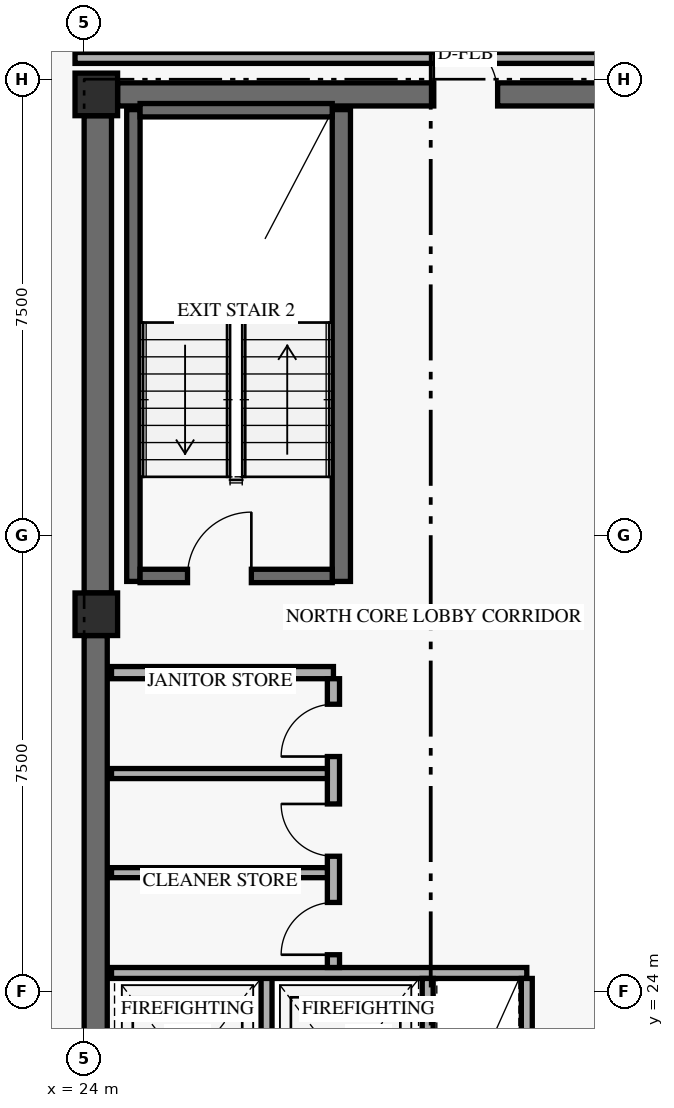
"""IFC4 building model, lengths in metres.
Left out: names, types, materials, properties, quantities, classifications, styles, units other than length and angle.
Written with IfcOpenShell. Run it as: python <this file> out.ifc"""

import sys

from ifc_helpers import new_model, si_unit, direction, frame, frame_2d, origin, origin_2d, place, context, subcontext, project, spatial, rectangle, extrude, element, fill, save


model = new_model("IFC4")
c1 = context("Model", 3, precision=1e-05, world=origin(), true_north=direction((0.0, 1.0)))
c2 = subcontext(c1, "Body", "Model", "MODEL_VIEW")
j1 = project(units=[si_unit("LENGTHUNIT", "METRE"), si_unit("PLANEANGLEUNIT", "RADIAN")], contexts=[c1])
p1 = place(None, origin())
s1 = spatial("IfcSite", under=j1, at=p1, CompositionType="ELEMENT")
p2 = place(p1, origin())
s2 = spatial("IfcBuilding", under=s1, at=p2, CompositionType="ELEMENT")
p3 = place(p2, frame((0.0, 0.0, 141.0)))
s3 = spatial("IfcBuildingStorey", under=s2, at=p3, CompositionType="ELEMENT", Elevation=141.0)
p4 = place(p3, frame((24.19, 17.9, 0.0), z_axis=(0.0, 0.0, 1.0), x_axis=(0.0, 1.0, 0.0)))
e1 = element("IfcWall", 1, at=p4, inside=s3, PredefinedType="SHEAR", context=c2, shape_type="SweptSolid", body=[
    extrude(rectangle(XDim=11.95, YDim=0.38, at=frame_2d((5.975, 0.0))), origin(), (0.0, 0.0, 1.0), 2.748),
])
p5 = place(p3, frame((24.225, 30.55, 0.0), z_axis=(0.0, 0.0, 1.0), x_axis=(0.0, 1.0, 0.0)))
e2 = element("IfcWall", 2, at=p5, inside=s3, PredefinedType="SHEAR", context=c2, shape_type="SweptSolid", body=[
    extrude(rectangle(XDim=7.85, YDim=0.45, at=frame_2d((3.925, 0.0))), origin(), (0.0, 0.0, 1.0), 2.748),
])
p6 = place(p3, frame((24.55, 38.75, 0.0), z_axis=(0.0, 0.0, 1.0), x_axis=(1.0, 0.0, 0.0)))
e3 = element("IfcWall", 3, at=p6, inside=s3, PredefinedType="SHEAR", context=c2, shape_type="SweptSolid", body=[
    extrude(rectangle(XDim=10.3, YDim=0.38, at=frame_2d((5.15, 0.0))), origin(), (0.0, 0.0, 1.0), 3.36),
])
p7 = place(p6, frame((5.2, 0.0, 0.0)))
e4 = element("IfcOpeningElement", 4, at=p7, cuts=e3, PredefinedType="OPENING", context=c2, shape_type="SweptSolid", body=[
    extrude(rectangle(XDim=1.05, YDim=2.15, at=frame_2d((0.525, 1.075))), frame((0.0, 0.2, 0.0), z_axis=(0.0, -1.0, 0.0), x_axis=(1.0, 0.0, 0.0)), (0.0, 0.0, 1.0), 0.4),
])
p8 = place(p3, frame((24.81, 30.74, 0.0), z_axis=(0.0, 0.0, 1.0), x_axis=(0.0, 1.0, 0.0)))
e5 = element("IfcWall", 5, at=p8, inside=s3, PredefinedType="SHEAR", context=c2, shape_type="SweptSolid", body=[
    extrude(rectangle(XDim=7.76, YDim=0.22, at=frame_2d((3.88, 0.0))), origin(), (0.0, 0.0, 1.0), 3.36),
])
p9 = place(p3, frame((28.23, 30.74, 0.0), z_axis=(0.0, 0.0, 1.0), x_axis=(0.0, 1.0, 0.0)))
e6 = element("IfcWall", 6, at=p9, inside=s3, PredefinedType="SHEAR", context=c2, shape_type="SweptSolid", body=[
    extrude(rectangle(XDim=7.76, YDim=0.3, at=frame_2d((3.88, 0.0))), origin(), (0.0, 0.0, 1.0), 3.36),
])
p10 = place(p3, frame((24.92, 30.83, 0.0), z_axis=(0.0, 0.0, 1.0), x_axis=(1.0, 0.0, 0.0)))
e7 = element("IfcWall", 7, at=p10, inside=s3, PredefinedType="SHEAR", context=c2, shape_type="SweptSolid", body=[
    extrude(rectangle(XDim=3.16, YDim=0.22, at=frame_2d((1.58, 0.0))), origin(), (0.0, 0.0, 1.0), 3.36),
])
p11 = place(p10, frame((0.78, 0.0, 0.0)))
e8 = element("IfcOpeningElement", 8, at=p11, cuts=e7, PredefinedType="OPENING", context=c2, shape_type="SweptSolid", body=[
    extrude(rectangle(XDim=1.05, YDim=2.15, at=frame_2d((0.525, 1.075))), frame((0.0, 0.12, 0.0), z_axis=(0.0, -1.0, 0.0), x_axis=(1.0, 0.0, 0.0)), (0.0, 0.0, 1.0), 0.24),
])
p12 = place(p3, frame((24.92, 38.49, 0.0), z_axis=(0.0, 0.0, 1.0), x_axis=(1.0, 0.0, 0.0)))
e9 = element("IfcWall", 9, at=p12, inside=s3, PredefinedType="SHEAR", context=c2, shape_type="SweptSolid", body=[
    extrude(rectangle(XDim=3.16, YDim=0.22, at=frame_2d((1.58, 0.0))), origin(), (0.0, 0.0, 1.0), 3.36),
])
for number, where, z_axis, x_axis in (
    (10, (24.2, 30.2, 0.0), (0.0, 0.0, 1.0), (1.0, 0.0, 0.0)),
    (11, (24.2, 38.75, 0.0), (0.0, 0.0, 1.0), (1.0, 0.0, 0.0)),
):
    element("IfcColumn", number, at=place(p3, frame(where, z_axis=z_axis, x_axis=x_axis)), inside=s3, PredefinedType="COLUMN", context=c2, shape_type="SweptSolid", body=[
        extrude(rectangle(XDim=0.7, YDim=0.7, at=origin_2d()), origin(), (0.0, 0.0, 1.0), 3.6),
    ])
p13 = place(p3, frame((27.0, 21.19, 0.0), z_axis=(0.0, 0.0, 1.0), x_axis=(0.0, 1.0, 0.0)))
e12 = element("IfcWall", 12, at=p13, inside=s3, PredefinedType="STANDARD", context=c2, shape_type="SweptSolid", body=[
    extrude(rectangle(XDim=3.11, YDim=0.18, at=frame_2d((1.555, 0.0))), origin(), (0.0, 0.0, 1.0), 3.36),
])
p14 = place(p3, frame((24.45, 24.3, 0.0), z_axis=(0.0, 0.0, 1.0), x_axis=(1.0, 0.0, 0.0)))
e13 = element("IfcWall", 13, at=p14, inside=s3, PredefinedType="STANDARD", context=c2, shape_type="SweptSolid", body=[
    extrude(rectangle(XDim=6.83, YDim=0.18, at=frame_2d((3.415, 0.0))), origin(), (0.0, 0.0, 1.0), 3.36),
])
for number, where, z_axis, x_axis in (
    (14, (29.65, 21.19, 0.0), (0.0, 0.0, 1.0), (0.0, 1.0, 0.0)),
    (15, (31.28, 21.19, 0.0), (0.0, 0.0, 1.0), (0.0, 1.0, 0.0)),
):
    element("IfcWall", number, at=place(p3, frame(where, z_axis=z_axis, x_axis=x_axis)), inside=s3, PredefinedType="STANDARD", context=c2, shape_type="SweptSolid", body=[
        extrude(rectangle(XDim=3.02, YDim=0.18, at=frame_2d((1.51, 0.0))), origin(), (0.0, 0.0, 1.0), 3.36),
    ])
p15 = place(p3, frame((24.45, 29.24, 0.0), z_axis=(0.0, 0.0, 1.0), x_axis=(1.0, 0.0, 0.0)))
e16 = element("IfcWall", 16, at=p15, inside=s3, PredefinedType="STANDARD", context=c2, shape_type="SweptSolid", body=[
    extrude(rectangle(XDim=3.65, YDim=0.2, at=frame_2d((1.825, 0.0))), origin(), (0.0, 0.0, 1.0), 3.36),
])
p16 = place(p3, frame((28.1, 24.39, 0.0), z_axis=(0.0, 0.0, 1.0), x_axis=(0.0, 1.0, 0.0)))
e17 = element("IfcWall", 17, at=p16, inside=s3, PredefinedType="STANDARD", context=c2, shape_type="SweptSolid", body=[
    extrude(rectangle(XDim=4.75, YDim=0.2, at=frame_2d((2.375, 0.0))), origin(), (0.0, 0.0, 1.0), 3.36),
])
p17 = place(p16, frame((0.21, 0.0, 0.0)))
e18 = element("IfcOpeningElement", 18, at=p17, cuts=e17, PredefinedType="OPENING", context=c2, shape_type="SweptSolid", body=[
    extrude(rectangle(XDim=0.86, YDim=2.1, at=frame_2d((0.43, 1.05))), frame((0.0, 0.11, 0.0), z_axis=(0.0, -1.0, 0.0), x_axis=(1.0, 0.0, 0.0)), (0.0, 0.0, 1.0), 0.22),
])
p18 = place(p16, frame((1.83, 0.0, 0.0)))
e19 = element("IfcOpeningElement", 19, at=p18, cuts=e17, PredefinedType="OPENING", context=c2, shape_type="SweptSolid", body=[
    extrude(rectangle(XDim=0.86, YDim=2.1, at=frame_2d((0.43, 1.05))), frame((0.0, 0.11, 0.0), z_axis=(0.0, -1.0, 0.0), x_axis=(1.0, 0.0, 0.0)), (0.0, 0.0, 1.0), 0.22),
])
p19 = place(p16, frame((3.47, 0.0, 0.0)))
e20 = element("IfcOpeningElement", 20, at=p19, cuts=e17, PredefinedType="OPENING", context=c2, shape_type="SweptSolid", body=[
    extrude(rectangle(XDim=0.86, YDim=2.1, at=frame_2d((0.43, 1.05))), frame((0.0, 0.11, 0.0), z_axis=(0.0, -1.0, 0.0), x_axis=(1.0, 0.0, 0.0)), (0.0, 0.0, 1.0), 0.22),
])
for number, where, z_axis, x_axis in (
    (21, (24.45, 25.95, 0.0), (0.0, 0.0, 1.0), (1.0, 0.0, 0.0)),
    (22, (24.45, 27.58, 0.0), (0.0, 0.0, 1.0), (1.0, 0.0, 0.0)),
):
    element("IfcWall", number, at=place(p3, frame(where, z_axis=z_axis, x_axis=x_axis)), inside=s3, PredefinedType="PARTITIONING", context=c2, shape_type="SweptSolid", body=[
        extrude(rectangle(XDim=3.55, YDim=0.165, at=frame_2d((1.775, 0.0))), origin(), (0.0, 0.0, 1.0), 3.36),
    ])
p20 = place(p3, frame((23.85, 39.35, 0.0), z_axis=(0.0, 0.0, 1.0), x_axis=(1.0, 0.0, 0.0)))
e23 = element("IfcWall", 23, at=p20, inside=s3, PredefinedType="STANDARD", context=c2, shape_type="SweptSolid", body=[
    extrude(rectangle(XDim=11.57, YDim=0.18, at=frame_2d((5.785, 0.0))), origin(), (0.0, 0.0, 1.0), 2.73),
])
p21 = place(p11, origin())
e24 = element("IfcDoor", 24, at=p21, inside=s3, OperationType="SINGLE_SWING_RIGHT", PredefinedType="DOOR", context=c2, shape_type="SweptSolid", body=[
    extrude(rectangle(XDim=1.05, YDim=2.15, at=frame_2d((0.525, 1.075))), frame((0.0, 0.025, 0.0), z_axis=(0.0, -1.0, 0.0), x_axis=(1.0, 0.0, 0.0)), (0.0, 0.0, 1.0), 0.05),
])
fill(e8, e24)
p22 = place(p17, origin())
e25 = element("IfcDoor", 25, at=p22, inside=s3, OperationType="SINGLE_SWING_LEFT", PredefinedType="DOOR", context=c2, shape_type="SweptSolid", body=[
    extrude(rectangle(XDim=0.86, YDim=2.1, at=frame_2d((0.43, 1.05))), frame((0.0, 0.025, 0.0), z_axis=(0.0, -1.0, 0.0), x_axis=(1.0, 0.0, 0.0)), (0.0, 0.0, 1.0), 0.05),
])
fill(e18, e25)
p23 = place(p18, origin())
e26 = element("IfcDoor", 26, at=p23, inside=s3, OperationType="SINGLE_SWING_RIGHT", PredefinedType="DOOR", context=c2, shape_type="SweptSolid", body=[
    extrude(rectangle(XDim=0.86, YDim=2.1, at=frame_2d((0.43, 1.05))), frame((0.0, 0.025, 0.0), z_axis=(0.0, -1.0, 0.0), x_axis=(1.0, 0.0, 0.0)), (0.0, 0.0, 1.0), 0.05),
])
fill(e19, e26)
p24 = place(p19, origin())
e27 = element("IfcDoor", 27, at=p24, inside=s3, OperationType="SINGLE_SWING_LEFT", PredefinedType="DOOR", context=c2, shape_type="SweptSolid", body=[
    extrude(rectangle(XDim=0.86, YDim=2.1, at=frame_2d((0.43, 1.05))), frame((0.0, 0.025, 0.0), z_axis=(0.0, -1.0, 0.0), x_axis=(1.0, 0.0, 0.0)), (0.0, 0.0, 1.0), 0.05),
])
fill(e20, e27)
p25 = place(p7, frame((1.05, 0.0, 0.0), z_axis=(0.0, 0.0, 1.0), x_axis=(-1.0, 0.0, 0.0)))
e28 = element("IfcDoor", 28, at=p25, inside=s3, OperationType="SINGLE_SWING_RIGHT", PredefinedType="DOOR", context=c2, shape_type="SweptSolid", body=[
    extrude(rectangle(XDim=1.05, YDim=2.15, at=frame_2d((0.525, 1.075))), frame((0.0, 0.025, 0.0), z_axis=(0.0, -1.0, 0.0), x_axis=(1.0, 0.0, 0.0)), (0.0, 0.0, 1.0), 0.05),
])
fill(e4, e28)
save(model, sys.argv[1])
